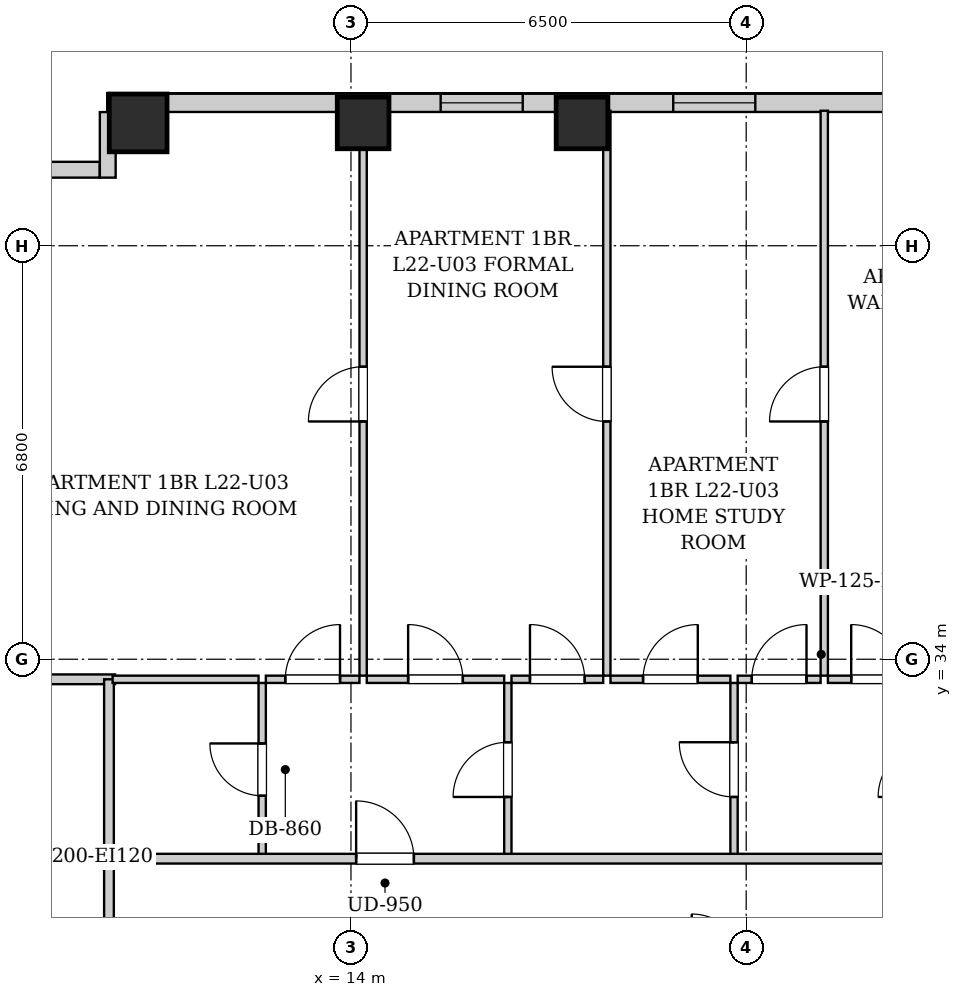
"""IFC4 building model, lengths in metres.
Left out: names, types, materials, properties, quantities, classifications, styles, units other than length and angle.
Written with IfcOpenShell. Run it as: python <this file> out.ifc"""

import sys

from ifc_helpers import new_model, si_unit, direction, frame, frame_2d, origin, origin_2d, place, context, subcontext, project, spatial, rectangle, extrude, element, fill, save


model = new_model("IFC4")
c1 = context("Model", 3, precision=1e-05, world=origin(), true_north=direction((0.0, 1.0)))
c2 = subcontext(c1, "Body", "Model", "MODEL_VIEW")
j1 = project(units=[si_unit("LENGTHUNIT", "METRE"), si_unit("PLANEANGLEUNIT", "RADIAN")], contexts=[c1])
p1 = place(None, origin())
s1 = spatial("IfcSite", under=j1, at=p1, CompositionType="ELEMENT")
p2 = place(p1, origin())
s2 = spatial("IfcBuilding", under=s1, at=p2, CompositionType="ELEMENT")
p3 = place(p2, frame((0.0, 0.0, 81.5)))
s3 = spatial("IfcBuildingStorey", under=s2, at=p3, CompositionType="ELEMENT", Elevation=81.5)
p4 = place(p3, frame((10.5, 42.82, 0.0), z_axis=(0.0, 0.0, 1.0), x_axis=(1.0, 0.0, 0.0)))
e1 = element("IfcColumn", 1, at=p4, inside=s3, PredefinedType="COLUMN", context=c2, shape_type="SweptSolid", body=[
    extrude(rectangle(XDim=0.95, YDim=0.95, at=origin_2d()), origin(), (0.0, 0.0, 1.0), 3.2),
])
for number, where, z_axis, x_axis in (
    (2, (14.2, 42.82, 0.0), (0.0, 0.0, 1.0), (1.0, 0.0, 0.0)),
    (3, (17.8, 42.82, 0.0), (0.0, 0.0, 1.0), (1.0, 0.0, 0.0)),
):
    element("IfcColumn", number, at=place(p3, frame(where, z_axis=z_axis, x_axis=x_axis)), inside=s3, PredefinedType="COLUMN", context=c2, shape_type="SweptSolid", body=[
        extrude(rectangle(XDim=0.85, YDim=0.85, at=origin_2d()), origin(), (0.0, 0.0, 1.0), 3.2),
    ])
p5 = place(p3, frame((10.0, 43.15, 0.0), z_axis=(0.0, 0.0, 1.0), x_axis=(1.0, 0.0, 0.0)))
e4 = element("IfcWall", 4, at=p5, inside=s3, PredefinedType="SOLIDWALL", context=c2, shape_type="SweptSolid", body=[
    extrude(rectangle(XDim=22.5, YDim=0.3, at=frame_2d((11.25, 0.0))), origin(), (0.0, 0.0, 1.0), 2.94),
])
p6 = place(p5, frame((5.475, 0.0, 0.55)))
e5 = element("IfcOpeningElement", 5, at=p6, cuts=e4, PredefinedType="OPENING", context=c2, shape_type="SweptSolid", body=[
    extrude(rectangle(XDim=1.35, YDim=1.2, at=frame_2d((0.675, 0.6))), frame((0.0, 0.16, 0.0), z_axis=(0.0, -1.0, 0.0), x_axis=(1.0, 0.0, 0.0)), (0.0, 0.0, 1.0), 0.32),
])
p7 = place(p5, frame((9.3, 0.0, 0.55)))
e6 = element("IfcOpeningElement", 6, at=p7, cuts=e4, PredefinedType="OPENING", context=c2, shape_type="SweptSolid", body=[
    extrude(rectangle(XDim=1.35, YDim=1.2, at=frame_2d((0.675, 0.6))), frame((0.0, 0.16, 0.0), z_axis=(0.0, -1.0, 0.0), x_axis=(1.0, 0.0, 0.0)), (0.0, 0.0, 1.0), 0.32),
])
p8 = place(p5, frame((18.975, 0.0, 0.55)))
e7 = element("IfcOpeningElement", 7, at=p8, cuts=e4, PredefinedType="OPENING", context=c2, shape_type="SweptSolid", body=[
    extrude(rectangle(XDim=1.35, YDim=1.2, at=frame_2d((0.675, 0.6))), frame((0.0, 0.16, 0.0), z_axis=(0.0, -1.0, 0.0), x_axis=(1.0, 0.0, 0.0)), (0.0, 0.0, 1.0), 0.32),
])
p9 = place(p5, frame((21.59, 0.0, 0.55)))
e8 = element("IfcOpeningElement", 8, at=p9, cuts=e4, PredefinedType="OPENING", context=c2, shape_type="SweptSolid", body=[
    extrude(rectangle(XDim=0.68, YDim=1.2, at=frame_2d((0.34, 0.6))), frame((0.0, 0.16, 0.0), z_axis=(0.0, -1.0, 0.0), x_axis=(1.0, 0.0, 0.0)), (0.0, 0.0, 1.0), 0.32),
])
p10 = place(p3, frame((8.882, 42.05, 0.0), z_axis=(0.0, 0.0, 1.0), x_axis=(1.0, 0.0, 0.0)))
e9 = element("IfcWall", 9, at=p10, inside=s3, PredefinedType="SOLIDWALL", context=c2, shape_type="SweptSolid", body=[
    extrude(rectangle(XDim=0.986, YDim=0.26, at=frame_2d((0.493, 0.0))), origin(), (0.0, 0.0, 1.0), 2.94),
])
p11 = place(p3, frame((10.0, 41.92, 0.0), z_axis=(0.0, 0.0, 1.0), x_axis=(0.0, 1.0, 0.0)))
e10 = element("IfcWall", 10, at=p11, inside=s3, PredefinedType="SOLIDWALL", context=c2, shape_type="SweptSolid", body=[
    extrude(rectangle(XDim=1.078, YDim=0.26, at=frame_2d((0.539, 0.0))), origin(), (0.0, 0.0, 1.0), 2.94),
])
p12 = place(p3, frame((10.02, 28.98, 0.0), z_axis=(0.0, 0.0, 1.0), x_axis=(0.0, 1.0, 0.0)))
e11 = element("IfcWall", 11, at=p12, inside=s3, PredefinedType="PARTITIONING", context=c2, shape_type="SweptSolid", body=[
    extrude(rectangle(XDim=1.74, YDim=0.16, at=frame_2d((0.87, 0.0))), origin(), (0.0, 0.0, 1.0), 2.94),
])
p13 = place(p3, frame((7.78, 33.67, 0.0), z_axis=(0.0, 0.0, 1.0), x_axis=(1.0, 0.0, 0.0)))
e12 = element("IfcWall", 12, at=p13, inside=s3, PredefinedType="PARTITIONING", context=c2, shape_type="SweptSolid", body=[
    extrude(rectangle(XDim=2.34, YDim=0.16, at=frame_2d((1.17, 0.0))), origin(), (0.0, 0.0, 1.0), 2.94),
])
p14 = place(p3, frame((10.02, 30.76, 0.0), z_axis=(0.0, 0.0, 1.0), x_axis=(0.0, 1.0, 0.0)))
e13 = element("IfcWall", 13, at=p14, inside=s3, PredefinedType="PARTITIONING", context=c2, shape_type="SweptSolid", body=[
    extrude(rectangle(XDim=2.91, YDim=0.16, at=frame_2d((1.455, 0.0))), origin(), (0.0, 0.0, 1.0), 2.94),
])
p15 = place(p3, frame((12.54, 30.76, 0.0), z_axis=(0.0, 0.0, 1.0), x_axis=(0.0, 1.0, 0.0)))
e14 = element("IfcWall", 14, at=p15, inside=s3, PredefinedType="PARTITIONING", context=c2, shape_type="SweptSolid", body=[
    extrude(rectangle(XDim=2.85, YDim=0.12, at=frame_2d((1.425, 0.0))), origin(), (0.0, 0.0, 1.0), 2.94),
])
p16 = place(p15, frame((0.995, 0.0, 0.0)))
e15 = element("IfcOpeningElement", 15, at=p16, cuts=e14, PredefinedType="OPENING", context=c2, shape_type="SweptSolid", body=[
    extrude(rectangle(XDim=0.86, YDim=2.05, at=frame_2d((0.43, 1.025))), frame((0.0, 0.07, 0.0), z_axis=(0.0, -1.0, 0.0), x_axis=(1.0, 0.0, 0.0)), (0.0, 0.0, 1.0), 0.14),
])
p17 = place(p3, frame((10.08, 33.67, 0.0), z_axis=(0.0, 0.0, 1.0), x_axis=(1.0, 0.0, 0.0)))
e16 = element("IfcWall", 16, at=p17, inside=s3, PredefinedType="PARTITIONING", context=c2, shape_type="SweptSolid", body=[
    extrude(rectangle(XDim=2.4, YDim=0.12, at=frame_2d((1.2, 0.0))), origin(), (0.0, 0.0, 1.0), 2.94),
])
p18 = place(p3, frame((16.58, 30.76, 0.0), z_axis=(0.0, 0.0, 1.0), x_axis=(0.0, 1.0, 0.0)))
e17 = element("IfcWall", 17, at=p18, inside=s3, PredefinedType="PARTITIONING", context=c2, shape_type="SweptSolid", body=[
    extrude(rectangle(XDim=2.85, YDim=0.12, at=frame_2d((1.425, 0.0))), origin(), (0.0, 0.0, 1.0), 2.94),
])
p19 = place(p18, frame((0.975, 0.0, 0.0)))
e18 = element("IfcOpeningElement", 18, at=p19, cuts=e17, PredefinedType="OPENING", context=c2, shape_type="SweptSolid", body=[
    extrude(rectangle(XDim=0.9, YDim=2.05, at=frame_2d((0.45, 1.025))), frame((0.0, 0.07, 0.0), z_axis=(0.0, -1.0, 0.0), x_axis=(1.0, 0.0, 0.0)), (0.0, 0.0, 1.0), 0.14),
])
p20 = place(p3, frame((12.6, 33.67, 0.0), z_axis=(0.0, 0.0, 1.0), x_axis=(1.0, 0.0, 0.0)))
e19 = element("IfcWall", 19, at=p20, inside=s3, PredefinedType="PARTITIONING", context=c2, shape_type="SweptSolid", body=[
    extrude(rectangle(XDim=1.54, YDim=0.12, at=frame_2d((0.77, 0.0))), origin(), (0.0, 0.0, 1.0), 2.94),
])
p21 = place(p20, frame((0.32, 0.0, 0.0)))
e20 = element("IfcOpeningElement", 20, at=p21, cuts=e19, PredefinedType="OPENING", context=c2, shape_type="SweptSolid", body=[
    extrude(rectangle(XDim=0.9, YDim=2.05, at=frame_2d((0.45, 1.025))), frame((0.0, 0.07, 0.0), z_axis=(0.0, -1.0, 0.0), x_axis=(1.0, 0.0, 0.0)), (0.0, 0.0, 1.0), 0.14),
])
p22 = place(p3, frame((14.26, 33.67, 0.0), z_axis=(0.0, 0.0, 1.0), x_axis=(1.0, 0.0, 0.0)))
e21 = element("IfcWall", 21, at=p22, inside=s3, PredefinedType="PARTITIONING", context=c2, shape_type="SweptSolid", body=[
    extrude(rectangle(XDim=2.26, YDim=0.12, at=frame_2d((1.13, 0.0))), origin(), (0.0, 0.0, 1.0), 2.94),
])
p23 = place(p22, frame((0.68, 0.0, 0.0)))
e22 = element("IfcOpeningElement", 22, at=p23, cuts=e21, PredefinedType="OPENING", context=c2, shape_type="SweptSolid", body=[
    extrude(rectangle(XDim=0.9, YDim=2.05, at=frame_2d((0.45, 1.025))), frame((0.0, 0.07, 0.0), z_axis=(0.0, -1.0, 0.0), x_axis=(1.0, 0.0, 0.0)), (0.0, 0.0, 1.0), 0.14),
])
p24 = place(p3, frame((20.3, 30.76, 0.0), z_axis=(0.0, 0.0, 1.0), x_axis=(0.0, 1.0, 0.0)))
e23 = element("IfcWall", 23, at=p24, inside=s3, PredefinedType="PARTITIONING", context=c2, shape_type="SweptSolid", body=[
    extrude(rectangle(XDim=2.85, YDim=0.12, at=frame_2d((1.425, 0.0))), origin(), (0.0, 0.0, 1.0), 2.94),
])
p25 = place(p24, frame((0.975, 0.0, 0.0)))
e24 = element("IfcOpeningElement", 24, at=p25, cuts=e23, PredefinedType="OPENING", context=c2, shape_type="SweptSolid", body=[
    extrude(rectangle(XDim=0.9, YDim=2.05, at=frame_2d((0.45, 1.025))), frame((0.0, 0.07, 0.0), z_axis=(0.0, -1.0, 0.0), x_axis=(1.0, 0.0, 0.0)), (0.0, 0.0, 1.0), 0.14),
])
p26 = place(p3, frame((16.64, 33.67, 0.0), z_axis=(0.0, 0.0, 1.0), x_axis=(1.0, 0.0, 0.0)))
e25 = element("IfcWall", 25, at=p26, inside=s3, PredefinedType="PARTITIONING", context=c2, shape_type="SweptSolid", body=[
    extrude(rectangle(XDim=1.508, YDim=0.12, at=frame_2d((0.754, 0.0))), origin(), (0.0, 0.0, 1.0), 2.94),
])
p27 = place(p26, frame((0.304, 0.0, 0.0)))
e26 = element("IfcOpeningElement", 26, at=p27, cuts=e25, PredefinedType="OPENING", context=c2, shape_type="SweptSolid", body=[
    extrude(rectangle(XDim=0.9, YDim=2.05, at=frame_2d((0.45, 1.025))), frame((0.0, 0.07, 0.0), z_axis=(0.0, -1.0, 0.0), x_axis=(1.0, 0.0, 0.0)), (0.0, 0.0, 1.0), 0.14),
])
p28 = place(p3, frame((18.268, 33.67, 0.0), z_axis=(0.0, 0.0, 1.0), x_axis=(1.0, 0.0, 0.0)))
e27 = element("IfcWall", 27, at=p28, inside=s3, PredefinedType="PARTITIONING", context=c2, shape_type="SweptSolid", body=[
    extrude(rectangle(XDim=1.972, YDim=0.12, at=frame_2d((0.986, 0.0))), origin(), (0.0, 0.0, 1.0), 2.94),
])
p29 = place(p28, frame((0.536, 0.0, 0.0)))
e28 = element("IfcOpeningElement", 28, at=p29, cuts=e27, PredefinedType="OPENING", context=c2, shape_type="SweptSolid", body=[
    extrude(rectangle(XDim=0.9, YDim=2.05, at=frame_2d((0.45, 1.025))), frame((0.0, 0.07, 0.0), z_axis=(0.0, -1.0, 0.0), x_axis=(1.0, 0.0, 0.0)), (0.0, 0.0, 1.0), 0.14),
])
p30 = place(p3, frame((20.36, 33.67, 0.0), z_axis=(0.0, 0.0, 1.0), x_axis=(1.0, 0.0, 0.0)))
e29 = element("IfcWall", 29, at=p30, inside=s3, PredefinedType="PARTITIONING", context=c2, shape_type="SweptSolid", body=[
    extrude(rectangle(XDim=1.364, YDim=0.12, at=frame_2d((0.682, 0.0))), origin(), (0.0, 0.0, 1.0), 2.94),
])
p31 = place(p30, frame((0.232, 0.0, 0.0)))
e30 = element("IfcOpeningElement", 30, at=p31, cuts=e29, PredefinedType="OPENING", context=c2, shape_type="SweptSolid", body=[
    extrude(rectangle(XDim=0.9, YDim=2.05, at=frame_2d((0.45, 1.025))), frame((0.0, 0.07, 0.0), z_axis=(0.0, -1.0, 0.0), x_axis=(1.0, 0.0, 0.0)), (0.0, 0.0, 1.0), 0.14),
])
p32 = place(p3, frame((21.844, 33.67, 0.0), z_axis=(0.0, 0.0, 1.0), x_axis=(1.0, 0.0, 0.0)))
e31 = element("IfcWall", 31, at=p32, inside=s3, PredefinedType="PARTITIONING", context=c2, shape_type="SweptSolid", body=[
    extrude(rectangle(XDim=1.666, YDim=0.12, at=frame_2d((0.833, 0.0))), origin(), (0.0, 0.0, 1.0), 2.94),
])
p33 = place(p32, frame((0.383, 0.0, 0.0)))
e32 = element("IfcOpeningElement", 32, at=p33, cuts=e31, PredefinedType="OPENING", context=c2, shape_type="SweptSolid", body=[
    extrude(rectangle(XDim=0.9, YDim=2.05, at=frame_2d((0.45, 1.025))), frame((0.0, 0.07, 0.0), z_axis=(0.0, -1.0, 0.0), x_axis=(1.0, 0.0, 0.0)), (0.0, 0.0, 1.0), 0.14),
])
p34 = place(p3, frame((14.2, 33.73, 0.0), z_axis=(0.0, 0.0, 1.0), x_axis=(0.0, 1.0, 0.0)))
e33 = element("IfcWall", 33, at=p34, inside=s3, PredefinedType="PARTITIONING", context=c2, shape_type="SweptSolid", body=[
    extrude(rectangle(XDim=9.29, YDim=0.12, at=frame_2d((4.645, 0.0))), origin(), (0.0, 0.0, 1.0), 2.94),
])
p35 = place(p34, frame((4.18, 0.0, 0.0)))
e34 = element("IfcOpeningElement", 34, at=p35, cuts=e33, PredefinedType="OPENING", context=c2, shape_type="SweptSolid", body=[
    extrude(rectangle(XDim=0.9, YDim=2.05, at=frame_2d((0.45, 1.025))), frame((0.0, 0.07, 0.0), z_axis=(0.0, -1.0, 0.0), x_axis=(1.0, 0.0, 0.0)), (0.0, 0.0, 1.0), 0.14),
])
p36 = place(p3, frame((18.208, 33.73, 0.0), z_axis=(0.0, 0.0, 1.0), x_axis=(0.0, 1.0, 0.0)))
e35 = element("IfcWall", 35, at=p36, inside=s3, PredefinedType="PARTITIONING", context=c2, shape_type="SweptSolid", body=[
    extrude(rectangle(XDim=9.29, YDim=0.12, at=frame_2d((4.645, 0.0))), origin(), (0.0, 0.0, 1.0), 2.94),
])
p37 = place(p36, frame((4.18, 0.0, 0.0)))
e36 = element("IfcOpeningElement", 36, at=p37, cuts=e35, PredefinedType="OPENING", context=c2, shape_type="SweptSolid", body=[
    extrude(rectangle(XDim=0.9, YDim=2.05, at=frame_2d((0.45, 1.025))), frame((0.0, 0.07, 0.0), z_axis=(0.0, -1.0, 0.0), x_axis=(1.0, 0.0, 0.0)), (0.0, 0.0, 1.0), 0.14),
])
p38 = place(p3, frame((21.784, 33.73, 0.0), z_axis=(0.0, 0.0, 1.0), x_axis=(0.0, 1.0, 0.0)))
e37 = element("IfcWall", 37, at=p38, inside=s3, PredefinedType="PARTITIONING", context=c2, shape_type="SweptSolid", body=[
    extrude(rectangle(XDim=9.29, YDim=0.12, at=frame_2d((4.645, 0.0))), origin(), (0.0, 0.0, 1.0), 2.94),
])
p39 = place(p38, frame((4.18, 0.0, 0.0)))
e38 = element("IfcOpeningElement", 38, at=p39, cuts=e37, PredefinedType="OPENING", context=c2, shape_type="SweptSolid", body=[
    extrude(rectangle(XDim=0.9, YDim=2.05, at=frame_2d((0.45, 1.025))), frame((0.0, 0.07, 0.0), z_axis=(0.0, -1.0, 0.0), x_axis=(1.0, 0.0, 0.0)), (0.0, 0.0, 1.0), 0.14),
])
p40 = place(p3, frame((10.05, 30.72, 0.0), z_axis=(0.0, 0.0, 1.0), x_axis=(1.0, 0.0, 0.0)))
e39 = element("IfcWall", 39, at=p40, inside=s3, PredefinedType="PARTITIONING", context=c2, shape_type="SweptSolid", body=[
    extrude(rectangle(XDim=30.8, YDim=0.16, at=frame_2d((15.4, 0.0))), origin(), (0.0, 0.0, 1.0), 2.94),
])
p41 = place(p40, frame((4.035, 0.0, 0.0)))
e40 = element("IfcOpeningElement", 40, at=p41, cuts=e39, PredefinedType="OPENING", context=c2, shape_type="SweptSolid", body=[
    extrude(rectangle(XDim=0.95, YDim=2.1, at=frame_2d((0.475, 1.05))), frame((0.0, 0.09, 0.0), z_axis=(0.0, -1.0, 0.0), x_axis=(1.0, 0.0, 0.0)), (0.0, 0.0, 1.0), 0.18),
])
p42 = place(p40, frame((25.175, 0.0, 0.0)))
e41 = element("IfcOpeningElement", 41, at=p42, cuts=e39, PredefinedType="OPENING", context=c2, shape_type="SweptSolid", body=[
    extrude(rectangle(XDim=0.95, YDim=2.1, at=frame_2d((0.475, 1.05))), frame((0.0, 0.09, 0.0), z_axis=(0.0, -1.0, 0.0), x_axis=(1.0, 0.0, 0.0)), (0.0, 0.0, 1.0), 0.18),
])
p43 = place(p16, origin())
e42 = element("IfcDoor", 42, at=p43, inside=s3, OperationType="SINGLE_SWING_RIGHT", PredefinedType="DOOR", context=c2, shape_type="SweptSolid", body=[
    extrude(rectangle(XDim=0.86, YDim=2.05, at=frame_2d((0.43, 1.025))), frame((0.0, 0.025, 0.0), z_axis=(0.0, -1.0, 0.0), x_axis=(1.0, 0.0, 0.0)), (0.0, 0.0, 1.0), 0.05),
])
fill(e15, e42)
p44 = place(p19, origin())
e43 = element("IfcDoor", 43, at=p44, inside=s3, OperationType="SINGLE_SWING_LEFT", PredefinedType="DOOR", context=c2, shape_type="SweptSolid", body=[
    extrude(rectangle(XDim=0.9, YDim=2.05, at=frame_2d((0.45, 1.025))), frame((0.0, 0.025, 0.0), z_axis=(0.0, -1.0, 0.0), x_axis=(1.0, 0.0, 0.0)), (0.0, 0.0, 1.0), 0.05),
])
fill(e18, e43)
p45 = place(p21, origin())
e44 = element("IfcDoor", 44, at=p45, inside=s3, OperationType="SINGLE_SWING_RIGHT", PredefinedType="DOOR", context=c2, shape_type="SweptSolid", body=[
    extrude(rectangle(XDim=0.9, YDim=2.05, at=frame_2d((0.45, 1.025))), frame((0.0, 0.025, 0.0), z_axis=(0.0, -1.0, 0.0), x_axis=(1.0, 0.0, 0.0)), (0.0, 0.0, 1.0), 0.05),
])
fill(e20, e44)
p46 = place(p23, origin())
e45 = element("IfcDoor", 45, at=p46, inside=s3, OperationType="SINGLE_SWING_LEFT", PredefinedType="DOOR", context=c2, shape_type="SweptSolid", body=[
    extrude(rectangle(XDim=0.9, YDim=2.05, at=frame_2d((0.45, 1.025))), frame((0.0, 0.025, 0.0), z_axis=(0.0, -1.0, 0.0), x_axis=(1.0, 0.0, 0.0)), (0.0, 0.0, 1.0), 0.05),
])
fill(e22, e45)
p47 = place(p25, origin())
e46 = element("IfcDoor", 46, at=p47, inside=s3, OperationType="SINGLE_SWING_RIGHT", PredefinedType="DOOR", context=c2, shape_type="SweptSolid", body=[
    extrude(rectangle(XDim=0.9, YDim=2.05, at=frame_2d((0.45, 1.025))), frame((0.0, 0.025, 0.0), z_axis=(0.0, -1.0, 0.0), x_axis=(1.0, 0.0, 0.0)), (0.0, 0.0, 1.0), 0.05),
])
fill(e24, e46)
p48 = place(p27, origin())
e47 = element("IfcDoor", 47, at=p48, inside=s3, OperationType="SINGLE_SWING_LEFT", PredefinedType="DOOR", context=c2, shape_type="SweptSolid", body=[
    extrude(rectangle(XDim=0.9, YDim=2.05, at=frame_2d((0.45, 1.025))), frame((0.0, 0.025, 0.0), z_axis=(0.0, -1.0, 0.0), x_axis=(1.0, 0.0, 0.0)), (0.0, 0.0, 1.0), 0.05),
])
fill(e26, e47)
p49 = place(p29, origin())
e48 = element("IfcDoor", 48, at=p49, inside=s3, OperationType="SINGLE_SWING_RIGHT", PredefinedType="DOOR", context=c2, shape_type="SweptSolid", body=[
    extrude(rectangle(XDim=0.9, YDim=2.05, at=frame_2d((0.45, 1.025))), frame((0.0, 0.025, 0.0), z_axis=(0.0, -1.0, 0.0), x_axis=(1.0, 0.0, 0.0)), (0.0, 0.0, 1.0), 0.05),
])
fill(e28, e48)
p50 = place(p31, origin())
e49 = element("IfcDoor", 49, at=p50, inside=s3, OperationType="SINGLE_SWING_RIGHT", PredefinedType="DOOR", context=c2, shape_type="SweptSolid", body=[
    extrude(rectangle(XDim=0.9, YDim=2.05, at=frame_2d((0.45, 1.025))), frame((0.0, 0.025, 0.0), z_axis=(0.0, -1.0, 0.0), x_axis=(1.0, 0.0, 0.0)), (0.0, 0.0, 1.0), 0.05),
])
fill(e30, e49)
p51 = place(p33, origin())
e50 = element("IfcDoor", 50, at=p51, inside=s3, OperationType="SINGLE_SWING_LEFT", PredefinedType="DOOR", context=c2, shape_type="SweptSolid", body=[
    extrude(rectangle(XDim=0.9, YDim=2.05, at=frame_2d((0.45, 1.025))), frame((0.0, 0.025, 0.0), z_axis=(0.0, -1.0, 0.0), x_axis=(1.0, 0.0, 0.0)), (0.0, 0.0, 1.0), 0.05),
])
fill(e32, e50)
p52 = place(p35, origin())
e51 = element("IfcDoor", 51, at=p52, inside=s3, OperationType="SINGLE_SWING_LEFT", PredefinedType="DOOR", context=c2, shape_type="SweptSolid", body=[
    extrude(rectangle(XDim=0.9, YDim=2.05, at=frame_2d((0.45, 1.025))), frame((0.0, 0.025, 0.0), z_axis=(0.0, -1.0, 0.0), x_axis=(1.0, 0.0, 0.0)), (0.0, 0.0, 1.0), 0.05),
])
fill(e34, e51)
p53 = place(p37, origin())
e52 = element("IfcDoor", 52, at=p53, inside=s3, OperationType="SINGLE_SWING_RIGHT", PredefinedType="DOOR", context=c2, shape_type="SweptSolid", body=[
    extrude(rectangle(XDim=0.9, YDim=2.05, at=frame_2d((0.45, 1.025))), frame((0.0, 0.025, 0.0), z_axis=(0.0, -1.0, 0.0), x_axis=(1.0, 0.0, 0.0)), (0.0, 0.0, 1.0), 0.05),
])
fill(e36, e52)
p54 = place(p39, origin())
e53 = element("IfcDoor", 53, at=p54, inside=s3, OperationType="SINGLE_SWING_LEFT", PredefinedType="DOOR", context=c2, shape_type="SweptSolid", body=[
    extrude(rectangle(XDim=0.9, YDim=2.05, at=frame_2d((0.45, 1.025))), frame((0.0, 0.025, 0.0), z_axis=(0.0, -1.0, 0.0), x_axis=(1.0, 0.0, 0.0)), (0.0, 0.0, 1.0), 0.05),
])
fill(e38, e53)
p55 = place(p41, origin())
e54 = element("IfcDoor", 54, at=p55, inside=s3, OperationType="SINGLE_SWING_LEFT", PredefinedType="DOOR", context=c2, shape_type="SweptSolid", body=[
    extrude(rectangle(XDim=0.95, YDim=2.1, at=frame_2d((0.475, 1.05))), frame((0.0, 0.025, 0.0), z_axis=(0.0, -1.0, 0.0), x_axis=(1.0, 0.0, 0.0)), (0.0, 0.0, 1.0), 0.05),
])
fill(e40, e54)
p56 = place(p6, origin())
e55 = element("IfcWindow", 55, at=p56, inside=s3, PartitioningType="SINGLE_PANEL", PredefinedType="WINDOW", context=c2, shape_type="SweptSolid", body=[
    extrude(rectangle(XDim=1.35, YDim=1.2, at=frame_2d((0.675, 0.6))), frame((0.0, 0.03, 0.0), z_axis=(0.0, -1.0, 0.0), x_axis=(1.0, 0.0, 0.0)), (0.0, 0.0, 1.0), 0.06),
])
fill(e5, e55)
p57 = place(p7, origin())
e56 = element("IfcWindow", 56, at=p57, inside=s3, PartitioningType="SINGLE_PANEL", PredefinedType="WINDOW", context=c2, shape_type="SweptSolid", body=[
    extrude(rectangle(XDim=1.35, YDim=1.2, at=frame_2d((0.675, 0.6))), frame((0.0, 0.03, 0.0), z_axis=(0.0, -1.0, 0.0), x_axis=(1.0, 0.0, 0.0)), (0.0, 0.0, 1.0), 0.06),
])
fill(e6, e56)
save(model, sys.argv[1])
